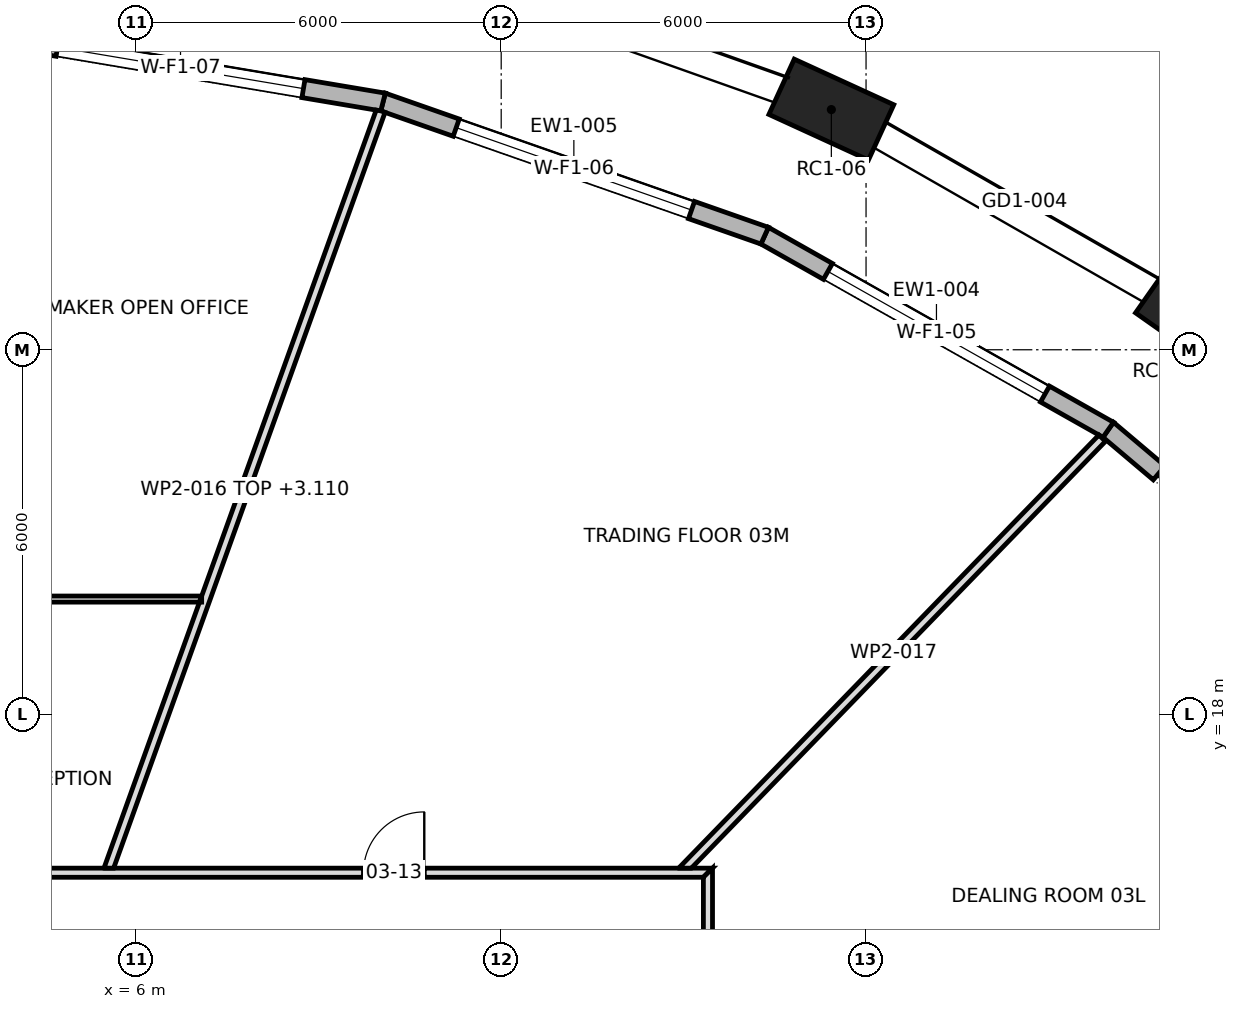
"""IFC4 building model, lengths in metres.
Left out: names, types, materials, properties, quantities, classifications, styles, units other than length and angle.
Written with IfcOpenShell. Run it as: python <this file> out.ifc"""

import sys

from ifc_helpers import new_model, si_unit, direction, frame, frame_2d, origin, origin_2d, place, context, subcontext, project, spatial, polyline, rectangle, outline, extrude, element, fill, save


model = new_model("IFC4")
c1 = context("Model", 3, precision=1e-05, world=origin(), true_north=direction((0.0, 1.0)))
c2 = subcontext(c1, "Body", "Model", "MODEL_VIEW")
j1 = project(units=[si_unit("LENGTHUNIT", "METRE"), si_unit("PLANEANGLEUNIT", "RADIAN")], contexts=[c1])
p1 = place(None, origin())
s1 = spatial("IfcSite", under=j1, at=p1, CompositionType="ELEMENT")
p2 = place(p1, origin())
s2 = spatial("IfcBuilding", under=s1, at=p2, CompositionType="ELEMENT")
p3 = place(p2, frame((0.0, 0.0, 57.1)))
s3 = spatial("IfcBuildingStorey", under=s2, at=p3, CompositionType="ELEMENT", Elevation=57.1)
for number, where, z_axis, x_axis in (
    (1, (23.456, 24.498, 0.0), (0.0, 0.0, 1.0), (-0.818, 0.575, 0.0)),
    (2, (17.429, 27.95, 0.0), (0.0, 0.0, 1.0), (-0.909, 0.417, 0.0)),
):
    element("IfcColumn", number, at=place(p3, frame(where, z_axis=z_axis, x_axis=x_axis)), inside=s3, PredefinedType="COLUMN", context=c2, shape_type="SweptSolid", body=[
        extrude(rectangle(XDim=1.8, YDim=1.0, at=origin_2d()), origin(), (0.0, 0.0, 1.0), 4.2),
    ])
p4 = place(p3, frame((26.79, 18.62, 0.0), z_axis=(0.0, 0.0, 1.0), x_axis=(-0.763614259808, 0.645672720671, 0.0)))
e3 = element("IfcWall", 3, at=p4, inside=s3, PredefinedType="STANDARD", context=c2, shape_type="SweptSolid", body=[
    extrude(outline(polyline([(-0.015, -0.15), (6.309, -0.15), (6.281, 0.15), (0.015, 0.15), (-0.015, -0.15)])), origin(), (0.0, 0.0, 1.0), 3.9),
])
p5 = place(p4, frame((1.097, 0.0, 0.0)))
e4 = element("IfcOpeningElement", 4, at=p5, cuts=e3, PredefinedType="OPENING", context=c2, shape_type="SweptSolid", body=[
    extrude(rectangle(XDim=4.1, YDim=3.45, at=frame_2d((2.05, 1.725))), frame((0.0, 0.162, 0.0), z_axis=(0.0, -1.0, 0.0), x_axis=(1.0, 0.0, 0.0)), (0.0, 0.0, 1.0), 0.324),
])
p6 = place(p3, frame((21.983, 22.684, 0.0), z_axis=(0.0, 0.0, 1.0), x_axis=(-0.870647609977, 0.491907246584, 0.0)))
e5 = element("IfcWall", 5, at=p6, inside=s3, PredefinedType="STANDARD", context=c2, shape_type="SweptSolid", body=[
    extrude(outline(polyline([(-0.014, -0.15), (6.503, -0.15), (6.476, 0.15), (0.014, 0.15), (-0.014, -0.15)])), origin(), (0.0, 0.0, 1.0), 3.9),
])
p7 = place(p6, frame((1.195, 0.0, 0.6)))
e6 = element("IfcOpeningElement", 6, at=p7, cuts=e5, PredefinedType="OPENING", context=c2, shape_type="SweptSolid", body=[
    extrude(rectangle(XDim=4.1, YDim=2.85, at=frame_2d((2.05, 1.425))), frame((0.0, 0.162, 0.0), z_axis=(0.0, -1.0, 0.0), x_axis=(1.0, 0.0, 0.0)), (0.0, 0.0, 1.0), 0.324),
])
p8 = place(p3, frame((16.333, 25.876, 0.0), z_axis=(0.0, 0.0, 1.0), x_axis=(-0.943790794479, 0.330543395421, 0.0)))
e7 = element("IfcWall", 7, at=p8, inside=s3, PredefinedType="STANDARD", context=c2, shape_type="SweptSolid", body=[
    extrude(outline(polyline([(-0.013, -0.15), (6.662, -0.15), (6.637, 0.15), (0.013, 0.15), (-0.013, -0.15)])), origin(), (0.0, 0.0, 1.0), 3.9),
])
p9 = place(p8, frame((1.275, 0.0, 0.6)))
e8 = element("IfcOpeningElement", 8, at=p9, cuts=e7, PredefinedType="OPENING", context=c2, shape_type="SweptSolid", body=[
    extrude(rectangle(XDim=4.1, YDim=2.85, at=frame_2d((2.05, 1.425))), frame((0.0, 0.162, 0.0), z_axis=(0.0, -1.0, 0.0), x_axis=(1.0, 0.0, 0.0)), (0.0, 0.0, 1.0), 0.324),
])
p10 = place(p3, frame((10.057, 28.074, 0.0), z_axis=(0.0, 0.0, 1.0), x_axis=(-0.986149614624, 0.165858185139, 0.0)))
e9 = element("IfcWall", 9, at=p10, inside=s3, PredefinedType="STANDARD", context=c2, shape_type="SweptSolid", body=[
    extrude(outline(polyline([(-0.013, -0.15), (6.767, -0.15), (6.742, 0.15), (0.013, 0.15), (-0.013, -0.15)])), origin(), (0.0, 0.0, 1.0), 3.9),
])
p11 = place(p10, frame((1.327, 0.0, 0.6)))
e10 = element("IfcOpeningElement", 10, at=p11, cuts=e9, PredefinedType="OPENING", context=c2, shape_type="SweptSolid", body=[
    extrude(rectangle(XDim=4.1, YDim=2.85, at=frame_2d((2.05, 1.425))), frame((0.0, 0.162, 0.0), z_axis=(0.0, -1.0, 0.0), x_axis=(1.0, 0.0, 0.0)), (0.0, 0.0, 1.0), 0.324),
])
p12 = place(p3, frame((-15.475, 15.4, 0.0), z_axis=(0.0, 0.0, 1.0), x_axis=(1.0, 0.0, 0.0)))
e11 = element("IfcWall", 11, at=p12, inside=s3, PredefinedType="PARTITIONING", context=c2, shape_type="SweptSolid", body=[
    extrude(outline(polyline([(0.15, -0.075), (2.066, -0.075), (3.981, -0.075), (5.897, -0.075), (7.812, -0.075), (9.728, -0.075), (11.644, -0.075), (13.56, -0.075), (15.475, -0.075), (17.391, -0.075), (19.306, -0.075), (21.222, -0.075), (23.138, -0.075), (25.053, -0.075), (26.969, -0.075), (28.885, -0.075), (30.8, -0.075), (30.95, 0.075), (29.016, 0.075), (27.081, 0.075), (25.147, 0.075), (23.212, 0.075), (21.278, 0.075), (19.344, 0.075), (17.409, 0.075), (15.475, 0.075), (13.541, 0.075), (11.606, 0.075), (9.672, 0.075), (7.738, 0.075), (5.803, 0.075), (3.869, 0.075), (1.935, 0.075), (0.0, 0.075), (0.15, -0.075)])), origin(), (0.0, 0.0, 1.0), 3.9),
])
p13 = place(p12, frame((16.84, 0.0, 0.0)))
e12 = element("IfcOpeningElement", 12, at=p13, cuts=e11, PredefinedType="OPENING", context=c2, shape_type="SweptSolid", body=[
    extrude(rectangle(XDim=1.0, YDim=2.1, at=frame_2d((0.5, 1.05))), frame((0.0, 0.087, 0.0), z_axis=(0.0, -1.0, 0.0), x_axis=(1.0, 0.0, 0.0)), (0.0, 0.0, 1.0), 0.174),
])
p14 = place(p12, frame((9.215, 0.0, 0.0)))
e13 = element("IfcOpeningElement", 13, at=p14, cuts=e11, PredefinedType="OPENING", context=c2, shape_type="SweptSolid", body=[
    extrude(rectangle(XDim=1.0, YDim=2.1, at=frame_2d((0.5, 1.05))), frame((0.0, 0.087, 0.0), z_axis=(0.0, -1.0, 0.0), x_axis=(1.0, 0.0, 0.0)), (0.0, 0.0, 1.0), 0.174),
])
p15 = place(p12, frame((25.21, 0.0, 0.0)))
e14 = element("IfcOpeningElement", 14, at=p15, cuts=e11, PredefinedType="OPENING", context=c2, shape_type="SweptSolid", body=[
    extrude(rectangle(XDim=1.0, YDim=2.1, at=frame_2d((0.5, 1.05))), frame((0.0, 0.087, 0.0), z_axis=(0.0, -1.0, 0.0), x_axis=(1.0, 0.0, 0.0)), (0.0, 0.0, 1.0), 0.174),
])
p16 = place(p3, frame((-2.247, 19.9, 0.0), z_axis=(0.0, 0.0, 1.0), x_axis=(1.0, 0.0, 0.0)))
e15 = element("IfcWall", 15, at=p16, inside=s3, PredefinedType="PARTITIONING", context=c2, shape_type="SweptSolid", body=[
    extrude(outline(polyline([(0.012, -0.05), (1.866, -0.05), (3.721, -0.05), (5.576, -0.05), (7.43, -0.05), (9.285, -0.05), (9.321, 0.049), (9.321, 0.05), (7.457, 0.05), (5.592, 0.05), (3.728, 0.05), (1.864, 0.05), (0.0, 0.05), (0.012, -0.05)])), origin(), (0.0, 0.0, 1.0), 3.9),
])
p17 = place(p16, frame((4.207, 0.0, 0.0)))
e16 = element("IfcOpeningElement", 16, at=p17, cuts=e15, PredefinedType="OPENING", context=c2, shape_type="SweptSolid", body=[
    extrude(rectangle(XDim=0.9, YDim=2.1, at=frame_2d((0.45, 1.05))), frame((0.0, 0.062, 0.0), z_axis=(0.0, -1.0, 0.0), x_axis=(1.0, 0.0, 0.0)), (0.0, 0.0, 1.0), 0.124),
])
p18 = place(p3, frame((5.538, 15.45, 0.0), z_axis=(0.0, 0.0, 1.0), x_axis=(0.337991057854, 0.941149321208, 0.0)))
e17 = element("IfcWall", 17, at=p18, inside=s3, PredefinedType="PARTITIONING", context=c2, shape_type="SweptSolid", body=[
    extrude(outline(polyline([(13.259, -0.075), (13.259, -0.041), (13.259, -0.0), (13.245, 0.075), (11.547, 0.075), (9.849, 0.075), (8.15, 0.075), (6.452, 0.075), (4.754, 0.075), (4.66, 0.042), (4.648, 0.075), (3.099, 0.075), (1.549, 0.075), (0.0, 0.075), (0.0, 0.074), (0.053, -0.075), (1.94, -0.075), (3.826, -0.075), (5.713, -0.075), (7.6, -0.075), (9.486, -0.075), (11.373, -0.075), (13.259, -0.075)])), origin(), (0.0, 0.0, 1.0), 3.11),
])
p19 = place(p3, frame((14.972, 15.423, 0.0), z_axis=(0.0, 0.0, 1.0), x_axis=(0.696324469813, 0.717727129722, 0.0)))
e18 = element("IfcWall", 18, at=p19, inside=s3, PredefinedType="PARTITIONING", context=c2, shape_type="SweptSolid", body=[
    extrude(outline(polyline([(0.0, 0.075), (0.0, 0.074), (0.145, -0.075), (2.101, -0.075), (4.057, -0.075), (6.012, -0.075), (7.968, -0.075), (9.924, -0.075), (9.924, 0.075), (7.939, 0.075), (5.954, 0.075), (3.97, 0.075), (1.985, 0.075), (0.0, 0.075)])), origin(), (0.0, 0.0, 1.0), 3.9),
])
p20 = place(p3, frame((15.4, -15.475, 0.0), z_axis=(0.0, 0.0, 1.0), x_axis=(0.0, 1.0, 0.0)))
e19 = element("IfcWall", 19, at=p20, inside=s3, PredefinedType="PARTITIONING", context=c2, shape_type="SweptSolid", body=[
    extrude(outline(polyline([(0.0, -0.075), (1.935, -0.075), (3.869, -0.075), (5.803, -0.075), (7.738, -0.075), (9.672, -0.075), (11.606, -0.075), (13.541, -0.075), (15.475, -0.075), (17.409, -0.075), (19.344, -0.075), (21.278, -0.075), (23.212, -0.075), (25.147, -0.075), (27.081, -0.075), (29.016, -0.075), (30.95, -0.075), (30.8, 0.075), (28.885, 0.075), (26.969, 0.075), (25.053, 0.075), (23.138, 0.075), (21.222, 0.075), (19.306, 0.075), (17.391, 0.075), (15.475, 0.075), (13.56, 0.075), (11.644, 0.075), (9.728, 0.075), (7.812, 0.075), (5.897, 0.075), (3.981, 0.075), (2.066, 0.075), (0.15, 0.075), (0.0, -0.075)])), origin(), (0.0, 0.0, 1.0), 3.9),
])
p21 = place(p20, frame((8.99, 0.0, 0.0)))
e20 = element("IfcOpeningElement", 20, at=p21, cuts=e19, PredefinedType="OPENING", context=c2, shape_type="SweptSolid", body=[
    extrude(rectangle(XDim=1.0, YDim=2.1, at=frame_2d((0.5, 1.05))), frame((0.0, 0.087, 0.0), z_axis=(0.0, -1.0, 0.0), x_axis=(1.0, 0.0, 0.0)), (0.0, 0.0, 1.0), 0.174),
])
p22 = place(p20, frame((17.815, 0.0, 0.0)))
e21 = element("IfcOpeningElement", 21, at=p22, cuts=e19, PredefinedType="OPENING", context=c2, shape_type="SweptSolid", body=[
    extrude(rectangle(XDim=1.0, YDim=2.1, at=frame_2d((0.5, 1.05))), frame((0.0, 0.087, 0.0), z_axis=(0.0, -1.0, 0.0), x_axis=(1.0, 0.0, 0.0)), (0.0, 0.0, 1.0), 0.174),
])
p23 = place(p20, frame((26.155, 0.0, 0.0)))
e22 = element("IfcOpeningElement", 22, at=p23, cuts=e19, PredefinedType="OPENING", context=c2, shape_type="SweptSolid", body=[
    extrude(rectangle(XDim=1.0, YDim=2.1, at=frame_2d((0.5, 1.05))), frame((0.0, 0.087, 0.0), z_axis=(0.0, -1.0, 0.0), x_axis=(1.0, 0.0, 0.0)), (0.0, 0.0, 1.0), 0.174),
])
p24 = place(p5, origin())
e23 = element("IfcDoor", 23, at=p24, inside=s3, OperationType="DOUBLE_DOOR_SLIDING", PredefinedType="DOOR", context=c2, shape_type="SweptSolid", body=[
    extrude(rectangle(XDim=4.1, YDim=3.45, at=frame_2d((2.05, 1.725))), frame((0.0, 0.025, 0.0), z_axis=(0.0, -1.0, 0.0), x_axis=(1.0, 0.0, 0.0)), (0.0, 0.0, 1.0), 0.05),
])
fill(e4, e23)
p25 = place(p7, origin())
e24 = element("IfcWindow", 24, at=p25, inside=s3, PartitioningType="TRIPLE_PANEL_VERTICAL", PredefinedType="WINDOW", context=c2, shape_type="SweptSolid", body=[
    extrude(rectangle(XDim=4.1, YDim=2.85, at=frame_2d((2.05, 1.425))), frame((0.0, 0.03, 0.0), z_axis=(0.0, -1.0, 0.0), x_axis=(1.0, 0.0, 0.0)), (0.0, 0.0, 1.0), 0.06),
])
fill(e6, e24)
p26 = place(p9, origin())
e25 = element("IfcWindow", 25, at=p26, inside=s3, PartitioningType="TRIPLE_PANEL_VERTICAL", PredefinedType="WINDOW", context=c2, shape_type="SweptSolid", body=[
    extrude(rectangle(XDim=4.1, YDim=2.85, at=frame_2d((2.05, 1.425))), frame((0.0, 0.03, 0.0), z_axis=(0.0, -1.0, 0.0), x_axis=(1.0, 0.0, 0.0)), (0.0, 0.0, 1.0), 0.06),
])
fill(e8, e25)
p27 = place(p11, origin())
e26 = element("IfcWindow", 26, at=p27, inside=s3, PartitioningType="TRIPLE_PANEL_VERTICAL", PredefinedType="WINDOW", context=c2, shape_type="SweptSolid", body=[
    extrude(rectangle(XDim=4.1, YDim=2.85, at=frame_2d((2.05, 1.425))), frame((0.0, 0.03, 0.0), z_axis=(0.0, -1.0, 0.0), x_axis=(1.0, 0.0, 0.0)), (0.0, 0.0, 1.0), 0.06),
])
fill(e10, e26)
p28 = place(p15, origin())
e27 = element("IfcDoor", 27, at=p28, inside=s3, OperationType="SINGLE_SWING_LEFT", PredefinedType="DOOR", context=c2, shape_type="SweptSolid", body=[
    extrude(rectangle(XDim=1.0, YDim=2.1, at=frame_2d((0.5, 1.05))), frame((0.0, 0.025, 0.0), z_axis=(0.0, -1.0, 0.0), x_axis=(1.0, 0.0, 0.0)), (0.0, 0.0, 1.0), 0.05),
])
fill(e14, e27)
save(model, sys.argv[1])
